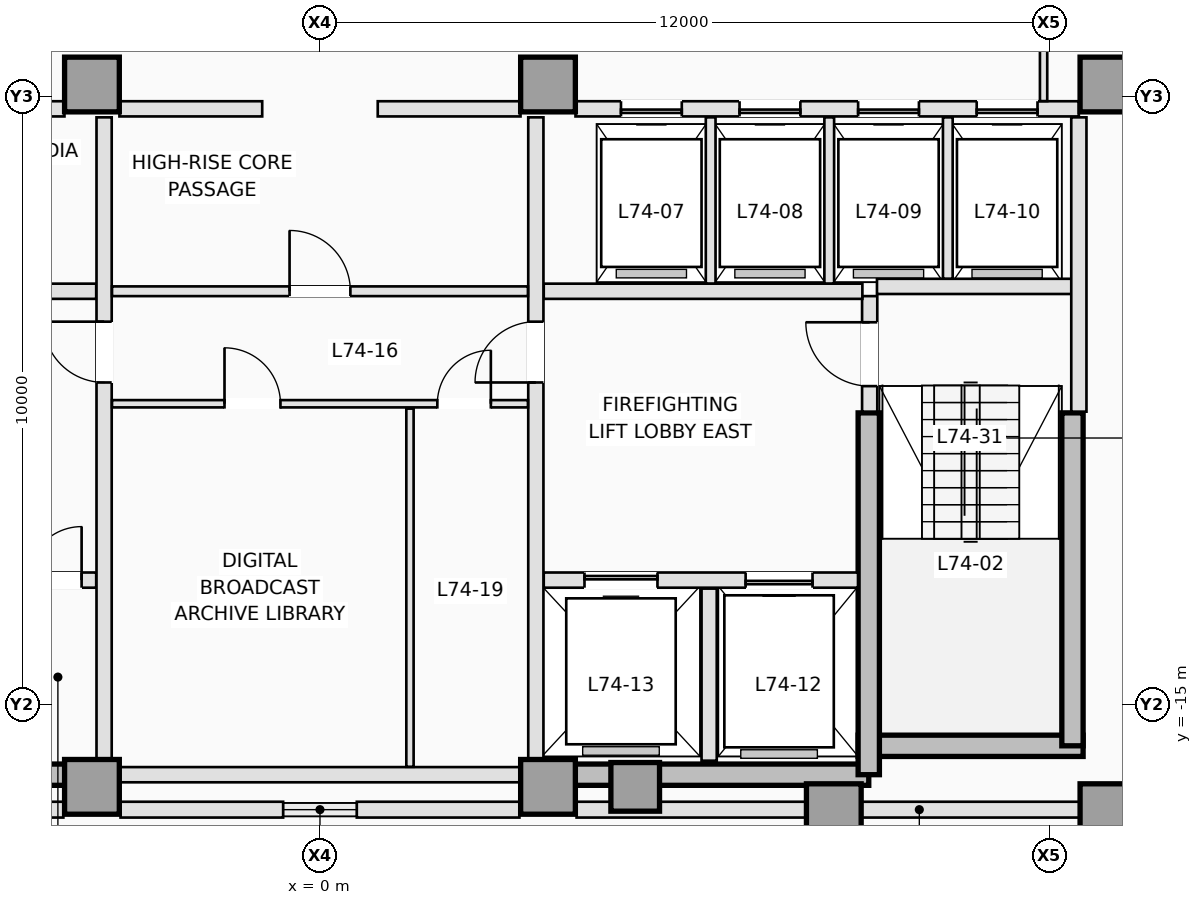
"""IFC4 building model, lengths in metres.
Left out: names, types, materials, properties, quantities, classifications, styles, units other than length and angle.
Written with IfcOpenShell. Run it as: python <this file> out.ifc"""

import sys

from ifc_helpers import new_model, si_unit, direction, frame, frame_2d, origin, origin_2d, place, context, subcontext, project, spatial, rectangle, extrude, element, fill, save


model = new_model("IFC4")
c1 = context("Model", 3, precision=1e-05, world=origin(), true_north=direction((0.0, 1.0)))
c2 = subcontext(c1, "Body", "Model", "MODEL_VIEW")
j1 = project(units=[si_unit("LENGTHUNIT", "METRE"), si_unit("PLANEANGLEUNIT", "RADIAN")], contexts=[c1])
p1 = place(None, origin())
s1 = spatial("IfcSite", under=j1, at=p1, CompositionType="ELEMENT")
p2 = place(p1, origin())
s2 = spatial("IfcBuilding", under=s1, at=p2, CompositionType="ELEMENT")
p3 = place(p2, frame((0.0, 0.0, 267.4)))
s3 = spatial("IfcBuildingStorey", under=s2, at=p3, CompositionType="ELEMENT", Elevation=267.4)
for number, where, z_axis, x_axis in (
    (1, (-9.025, -16.15, 0.0), (0.0, 0.0, 1.0), (1.0, 0.0, 0.0)),
    (2, (3.75, -16.15, 0.0), (0.0, 0.0, 1.0), (1.0, 0.0, 0.0)),
):
    element("IfcWall", number, at=place(p3, frame(where, z_axis=z_axis, x_axis=x_axis)), inside=s3, PredefinedType="SHEAR", context=c2, shape_type="SweptSolid", body=[
        extrude(rectangle(XDim=5.275, YDim=0.35, at=frame_2d((2.637, 0.0))), origin(), (0.0, 0.0, 1.0), 3.5),
    ])
p4 = place(p3, frame((8.85, -15.675, 0.0), z_axis=(0.0, 0.0, 1.0), x_axis=(1.0, 0.0, 0.0)))
e3 = element("IfcWall", 3, at=p4, inside=s3, PredefinedType="SHEAR", context=c2, shape_type="SweptSolid", body=[
    extrude(rectangle(XDim=3.7, YDim=0.35, at=frame_2d((1.85, 0.0))), origin(), (0.0, 0.0, 1.0), 3.5),
])
p5 = place(p3, frame((12.375, -15.675, 0.0), z_axis=(0.0, 0.0, 1.0), x_axis=(0.0, 1.0, 0.0)))
e4 = element("IfcWall", 4, at=p5, inside=s3, PredefinedType="SHEAR", context=c2, shape_type="SweptSolid", body=[
    extrude(rectangle(XDim=5.475, YDim=0.35, at=frame_2d((2.738, 0.0))), origin(), (0.0, 0.0, 1.0), 3.5),
])
p6 = place(p3, frame((9.025, -16.15, 0.0), z_axis=(0.0, 0.0, 1.0), x_axis=(0.0, 1.0, 0.0)))
e5 = element("IfcWall", 5, at=p6, inside=s3, PredefinedType="SHEAR", context=c2, shape_type="SweptSolid", body=[
    extrude(rectangle(XDim=5.95, YDim=0.35, at=frame_2d((2.975, 0.0))), origin(), (0.0, 0.0, 1.0), 3.5),
])
for number, where, z_axis, x_axis in (
    (6, (-3.75, -16.35, 0.0), (0.0, 0.0, 1.0), (1.0, 0.0, 0.0)),
    (7, (3.75, -16.35, 0.0), (0.0, 0.0, 1.0), (1.0, 0.0, 0.0)),
    (8, (8.45, -16.75, 0.0), (0.0, 0.0, 1.0), (1.0, 0.0, 0.0)),
    (9, (12.95, -16.75, 0.0), (0.0, 0.0, 1.0), (1.0, 0.0, 0.0)),
    (10, (-3.75, -4.8, 0.0), (0.0, 0.0, 1.0), (1.0, 0.0, 0.0)),
    (11, (3.75, -4.8, 0.0), (0.0, 0.0, 1.0), (1.0, 0.0, 0.0)),
    (12, (12.95, -4.8, 0.0), (0.0, 0.0, 1.0), (1.0, 0.0, 0.0)),
):
    element("IfcColumn", number, at=place(p3, frame(where, z_axis=z_axis, x_axis=x_axis)), inside=s3, PredefinedType="COLUMN", context=c2, shape_type="SweptSolid", body=[
        extrude(rectangle(XDim=0.9, YDim=0.9, at=origin_2d()), origin(), (0.0, 0.0, 1.0), 3.5),
    ])
p7 = place(p3, frame((5.184, -16.35, 0.0), z_axis=(0.0, 0.0, 1.0), x_axis=(0.0, 1.0, 0.0)))
e13 = element("IfcColumn", 13, at=p7, inside=s3, PredefinedType="COLUMN", context=c2, shape_type="SweptSolid", body=[
    extrude(rectangle(XDim=0.8, YDim=0.8, at=origin_2d()), origin(), (0.0, 0.0, 1.0), 3.5),
])
for number, where, z_axis, x_axis in (
    (14, (15.493, -16.725, 0.0), (0.0, 0.0, 1.0), (-1.0, 0.0, 0.0)),
    (15, (-4.22, -16.725, 0.0), (0.0, 0.0, 1.0), (-1.0, 0.0, 0.0)),
):
    element("IfcWall", number, at=place(p3, frame(where, z_axis=z_axis, x_axis=x_axis)), inside=s3, PredefinedType="STANDARD", context=c2, shape_type="SweptSolid", body=[
        extrude(rectangle(XDim=11.273, YDim=0.26, at=frame_2d((5.636, 0.0))), origin(), (0.0, 0.0, 1.0), 2.72),
    ])
for number, where, z_axis, x_axis in (
    (16, (3.28, -16.725, 0.0), (0.0, 0.0, 1.0), (-1.0, 0.0, 0.0)),
    (17, (-0.606, -16.725, 0.0), (0.0, 0.0, 1.0), (-1.0, 0.0, 0.0)),
):
    element("IfcWall", number, at=place(p3, frame(where, z_axis=z_axis, x_axis=x_axis)), inside=s3, PredefinedType="STANDARD", context=c2, shape_type="SweptSolid", body=[
        extrude(rectangle(XDim=2.674, YDim=0.26, at=frame_2d((1.337, 0.0))), origin(), (0.0, 0.0, 1.0), 3.18),
    ])
p8 = place(p3, frame((9.04, -10.18, 0.0), z_axis=(0.0, 0.0, 1.0), x_axis=(0.0, 1.0, 0.0)))
e18 = element("IfcWall", 18, at=p8, inside=s3, PredefinedType="PARTITIONING", context=c2, shape_type="SweptSolid", body=[
    extrude(rectangle(XDim=1.9, YDim=0.25, at=frame_2d((0.95, 0.0))), origin(), (0.0, 0.0, 1.0), 3.18),
])
p9 = place(p8, frame((0.42, 0.0, 0.0)))
e19 = element("IfcOpeningElement", 19, at=p9, cuts=e18, PredefinedType="OPENING", context=c2, shape_type="SweptSolid", body=[
    extrude(rectangle(XDim=1.05, YDim=2.15, at=frame_2d((0.525, 1.075))), frame((0.0, 0.135, 0.0), z_axis=(0.0, -1.0, 0.0), x_axis=(1.0, 0.0, 0.0)), (0.0, 0.0, 1.0), 0.27),
])
p10 = place(p3, frame((9.16, -8.12, 0.0), z_axis=(0.0, 0.0, 1.0), x_axis=(1.0, 0.0, 0.0)))
e20 = element("IfcWall", 20, at=p10, inside=s3, PredefinedType="PARTITIONING", context=c2, shape_type="SweptSolid", body=[
    extrude(rectangle(XDim=3.22, YDim=0.25, at=frame_2d((1.61, 0.0))), origin(), (0.0, 0.0, 1.0), 3.18),
])
p11 = place(p3, frame((12.48, -10.18, 0.0), z_axis=(0.0, 0.0, 1.0), x_axis=(0.0, 1.0, 0.0)))
e21 = element("IfcWall", 21, at=p11, inside=s3, PredefinedType="PARTITIONING", context=c2, shape_type="SweptSolid", body=[
    extrude(rectangle(XDim=4.84, YDim=0.25, at=frame_2d((2.42, 0.0))), origin(), (0.0, 0.0, 1.0), 3.18),
])
p12 = place(p3, frame((-8.848, -12.95, 0.0), z_axis=(0.0, 0.0, 1.0), x_axis=(1.0, 0.0, 0.0)))
e22 = element("IfcWall", 22, at=p12, inside=s3, PredefinedType="PARTITIONING", context=c2, shape_type="SweptSolid", body=[
    extrude(rectangle(XDim=5.168, YDim=0.25, at=frame_2d((2.584, 0.0))), origin(), (0.0, 0.0, 1.0), 3.18),
])
p13 = place(p12, frame((0.748, 0.0, 0.0)))
e23 = element("IfcOpeningElement", 23, at=p13, cuts=e22, PredefinedType="OPENING", context=c2, shape_type="SweptSolid", body=[
    extrude(rectangle(XDim=1.1, YDim=2.15, at=frame_2d((0.55, 1.075))), frame((0.0, 0.135, 0.0), z_axis=(0.0, -1.0, 0.0), x_axis=(1.0, 0.0, 0.0)), (0.0, 0.0, 1.0), 0.27),
])
p14 = place(p12, frame((2.648, 0.0, 0.0)))
e24 = element("IfcOpeningElement", 24, at=p14, cuts=e22, PredefinedType="OPENING", context=c2, shape_type="SweptSolid", body=[
    extrude(rectangle(XDim=0.88, YDim=2.1, at=frame_2d((0.44, 1.05))), frame((0.0, 0.135, 0.0), z_axis=(0.0, -1.0, 0.0), x_axis=(1.0, 0.0, 0.0)), (0.0, 0.0, 1.0), 0.27),
])
p15 = place(p12, frame((4.048, 0.0, 0.0)))
e25 = element("IfcOpeningElement", 25, at=p15, cuts=e22, PredefinedType="OPENING", context=c2, shape_type="SweptSolid", body=[
    extrude(rectangle(XDim=0.88, YDim=2.1, at=frame_2d((0.44, 1.05))), frame((0.0, 0.135, 0.0), z_axis=(0.0, -1.0, 0.0), x_axis=(1.0, 0.0, 0.0)), (0.0, 0.0, 1.0), 0.27),
])
p16 = place(p3, frame((3.68, -12.95, 0.0), z_axis=(0.0, 0.0, 1.0), x_axis=(1.0, 0.0, 0.0)))
e26 = element("IfcWall", 26, at=p16, inside=s3, PredefinedType="PARTITIONING", context=c2, shape_type="SweptSolid", body=[
    extrude(rectangle(XDim=5.168, YDim=0.25, at=frame_2d((2.584, 0.0))), origin(), (0.0, 0.0, 1.0), 3.18),
])
p17 = place(p16, frame((3.32, 0.0, 0.0)))
e27 = element("IfcOpeningElement", 27, at=p17, cuts=e26, PredefinedType="OPENING", context=c2, shape_type="SweptSolid", body=[
    extrude(rectangle(XDim=1.1, YDim=2.15, at=frame_2d((0.55, 1.075))), frame((0.0, 0.135, 0.0), z_axis=(0.0, -1.0, 0.0), x_axis=(1.0, 0.0, 0.0)), (0.0, 0.0, 1.0), 0.27),
])
p18 = place(p16, frame((0.67, 0.0, 0.0)))
e28 = element("IfcOpeningElement", 28, at=p18, cuts=e26, PredefinedType="OPENING", context=c2, shape_type="SweptSolid", body=[
    extrude(rectangle(XDim=1.2, YDim=2.15, at=frame_2d((0.6, 1.075))), frame((0.0, 0.135, 0.0), z_axis=(0.0, -1.0, 0.0), x_axis=(1.0, 0.0, 0.0)), (0.0, 0.0, 1.0), 0.27),
])
p19 = place(p3, frame((6.4, -15.92, 0.0), z_axis=(0.0, 0.0, 1.0), x_axis=(0.0, 1.0, 0.0)))
e29 = element("IfcWall", 29, at=p19, inside=s3, PredefinedType="PARTITIONING", context=c2, shape_type="SweptSolid", body=[
    extrude(rectangle(XDim=2.83, YDim=0.25, at=frame_2d((1.415, 0.0))), origin(), (0.0, 0.0, 1.0), 3.18),
])
for number, where, z_axis, x_axis in (
    (30, (-8.92, -8.2, 0.0), (0.0, 0.0, 1.0), (1.0, 0.0, 0.0)),
    (31, (3.68, -8.2, 0.0), (0.0, 0.0, 1.0), (1.0, 0.0, 0.0)),
):
    element("IfcWall", number, at=place(p3, frame(where, z_axis=z_axis, x_axis=x_axis)), inside=s3, PredefinedType="PARTITIONING", context=c2, shape_type="SweptSolid", body=[
        extrude(rectangle(XDim=5.24, YDim=0.25, at=frame_2d((2.62, 0.0))), origin(), (0.0, 0.0, 1.0), 3.18),
    ])
p20 = place(p3, frame((-3.55, -15.898, 0.0), z_axis=(0.0, 0.0, 1.0), x_axis=(0.0, 1.0, 0.0)))
e32 = element("IfcWall", 32, at=p20, inside=s3, PredefinedType="PARTITIONING", context=c2, shape_type="SweptSolid", body=[
    extrude(rectangle(XDim=10.558, YDim=0.25, at=frame_2d((5.279, 0.0))), origin(), (0.0, 0.0, 1.0), 3.18),
])
p21 = place(p20, frame((6.198, 0.0, 0.0)))
e33 = element("IfcOpeningElement", 33, at=p21, cuts=e32, PredefinedType="OPENING", context=c2, shape_type="SweptSolid", body=[
    extrude(rectangle(XDim=1.0, YDim=2.15, at=frame_2d((0.5, 1.075))), frame((0.0, 0.135, 0.0), z_axis=(0.0, -1.0, 0.0), x_axis=(1.0, 0.0, 0.0)), (0.0, 0.0, 1.0), 0.27),
])
p22 = place(p3, frame((3.55, -15.898, 0.0), z_axis=(0.0, 0.0, 1.0), x_axis=(0.0, 1.0, 0.0)))
e34 = element("IfcWall", 34, at=p22, inside=s3, PredefinedType="PARTITIONING", context=c2, shape_type="SweptSolid", body=[
    extrude(rectangle(XDim=10.558, YDim=0.25, at=frame_2d((5.279, 0.0))), origin(), (0.0, 0.0, 1.0), 3.18),
])
p23 = place(p22, frame((6.198, 0.0, 0.0)))
e35 = element("IfcOpeningElement", 35, at=p23, cuts=e34, PredefinedType="OPENING", context=c2, shape_type="SweptSolid", body=[
    extrude(rectangle(XDim=1.0, YDim=2.15, at=frame_2d((0.5, 1.075))), frame((0.0, 0.135, 0.0), z_axis=(0.0, -1.0, 0.0), x_axis=(1.0, 0.0, 0.0)), (0.0, 0.0, 1.0), 0.27),
])
p24 = place(p3, frame((-12.48, -5.2, 0.0), z_axis=(0.0, 0.0, 1.0), x_axis=(1.0, 0.0, 0.0)))
e36 = element("IfcWall", 36, at=p24, inside=s3, PredefinedType="PARTITIONING", context=c2, shape_type="SweptSolid", body=[
    extrude(rectangle(XDim=8.278, YDim=0.25, at=frame_2d((4.139, 0.0))), origin(), (0.0, 0.0, 1.0), 3.18),
])
p25 = place(p24, frame((3.05, 0.0, 0.0)))
e37 = element("IfcOpeningElement", 37, at=p25, cuts=e36, PredefinedType="OPENING", context=c2, shape_type="SweptSolid", body=[
    extrude(rectangle(XDim=0.92, YDim=2.12, at=frame_2d((0.46, 1.06))), frame((0.0, 0.135, 0.0), z_axis=(0.0, -1.0, 0.0), x_axis=(1.0, 0.0, 0.0)), (0.0, 0.0, 1.0), 0.27),
])
p26 = place(p24, frame((6.15, 0.0, 0.0)))
e38 = element("IfcOpeningElement", 38, at=p26, cuts=e36, PredefinedType="OPENING", context=c2, shape_type="SweptSolid", body=[
    extrude(rectangle(XDim=0.92, YDim=2.12, at=frame_2d((0.46, 1.06))), frame((0.0, 0.135, 0.0), z_axis=(0.0, -1.0, 0.0), x_axis=(1.0, 0.0, 0.0)), (0.0, 0.0, 1.0), 0.27),
])
p27 = place(p3, frame((4.202, -5.2, 0.0), z_axis=(0.0, 0.0, 1.0), x_axis=(1.0, 0.0, 0.0)))
e39 = element("IfcWall", 39, at=p27, inside=s3, PredefinedType="PARTITIONING", context=c2, shape_type="SweptSolid", body=[
    extrude(rectangle(XDim=8.278, YDim=0.25, at=frame_2d((4.139, 0.0))), origin(), (0.0, 0.0, 1.0), 3.18),
])
p28 = place(p27, frame((0.748, 0.0, 0.0)))
e40 = element("IfcOpeningElement", 40, at=p28, cuts=e39, PredefinedType="OPENING", context=c2, shape_type="SweptSolid", body=[
    extrude(rectangle(XDim=1.0, YDim=2.15, at=frame_2d((0.5, 1.075))), frame((0.0, 0.135, 0.0), z_axis=(0.0, -1.0, 0.0), x_axis=(1.0, 0.0, 0.0)), (0.0, 0.0, 1.0), 0.27),
])
p29 = place(p27, frame((2.698, 0.0, 0.0)))
e41 = element("IfcOpeningElement", 41, at=p29, cuts=e39, PredefinedType="OPENING", context=c2, shape_type="SweptSolid", body=[
    extrude(rectangle(XDim=1.0, YDim=2.15, at=frame_2d((0.5, 1.075))), frame((0.0, 0.135, 0.0), z_axis=(0.0, -1.0, 0.0), x_axis=(1.0, 0.0, 0.0)), (0.0, 0.0, 1.0), 0.27),
])
p30 = place(p27, frame((4.648, 0.0, 0.0)))
e42 = element("IfcOpeningElement", 42, at=p30, cuts=e39, PredefinedType="OPENING", context=c2, shape_type="SweptSolid", body=[
    extrude(rectangle(XDim=1.0, YDim=2.15, at=frame_2d((0.5, 1.075))), frame((0.0, 0.135, 0.0), z_axis=(0.0, -1.0, 0.0), x_axis=(1.0, 0.0, 0.0)), (0.0, 0.0, 1.0), 0.27),
])
p31 = place(p27, frame((6.598, 0.0, 0.0)))
e43 = element("IfcOpeningElement", 43, at=p31, cuts=e39, PredefinedType="OPENING", context=c2, shape_type="SweptSolid", body=[
    extrude(rectangle(XDim=1.0, YDim=2.15, at=frame_2d((0.5, 1.075))), frame((0.0, 0.135, 0.0), z_axis=(0.0, -1.0, 0.0), x_axis=(1.0, 0.0, 0.0)), (0.0, 0.0, 1.0), 0.27),
])
for number, where, z_axis, x_axis in (
    (44, (-3.298, -5.2, 0.0), (0.0, 0.0, 1.0), (1.0, 0.0, 0.0)),
    (45, (0.95, -5.2, 0.0), (0.0, 0.0, 1.0), (1.0, 0.0, 0.0)),
):
    element("IfcWall", number, at=place(p3, frame(where, z_axis=z_axis, x_axis=x_axis)), inside=s3, PredefinedType="PARTITIONING", context=c2, shape_type="SweptSolid", body=[
        extrude(rectangle(XDim=2.348, YDim=0.25, at=frame_2d((1.174, 0.0))), origin(), (0.0, 0.0, 1.0), 3.18),
    ])
for number, where, z_axis, x_axis in (
    (46, (6.425, -8.073, 0.0), (0.0, 0.0, 1.0), (0.0, 1.0, 0.0)),
    (47, (8.375, -8.073, 0.0), (0.0, 0.0, 1.0), (0.0, 1.0, 0.0)),
):
    element("IfcWall", number, at=place(p3, frame(where, z_axis=z_axis, x_axis=x_axis)), inside=s3, PredefinedType="PARTITIONING", context=c2, shape_type="SweptSolid", body=[
        extrude(rectangle(XDim=2.733, YDim=0.16, at=frame_2d((1.366, 0.0))), origin(), (0.0, 0.0, 1.0), 3.18),
    ])
p32 = place(p3, frame((10.325, -7.993, 0.0), z_axis=(0.0, 0.0, 1.0), x_axis=(0.0, 1.0, 0.0)))
e48 = element("IfcWall", 48, at=p32, inside=s3, PredefinedType="PARTITIONING", context=c2, shape_type="SweptSolid", body=[
    extrude(rectangle(XDim=2.653, YDim=0.16, at=frame_2d((1.326, 0.0))), origin(), (0.0, 0.0, 1.0), 3.18),
])
p33 = place(p3, frame((-3.298, -16.15, 0.0), z_axis=(0.0, 0.0, 1.0), x_axis=(1.0, 0.0, 0.0)))
e49 = element("IfcWall", 49, at=p33, inside=s3, PredefinedType="PARTITIONING", context=c2, shape_type="SweptSolid", body=[
    extrude(rectangle(XDim=6.596, YDim=0.25, at=frame_2d((3.298, 0.0))), origin(), (0.0, 0.0, 1.0), 2.774),
])
p34 = place(p3, frame((-3.42, -8.2, 0.0), z_axis=(0.0, 0.0, 1.0), x_axis=(1.0, 0.0, 0.0)))
e50 = element("IfcWall", 50, at=p34, inside=s3, PredefinedType="PARTITIONING", context=c2, shape_type="SweptSolid", body=[
    extrude(rectangle(XDim=6.84, YDim=0.16, at=frame_2d((3.42, 0.0))), origin(), (0.0, 0.0, 1.0), 3.18),
])
p35 = place(p34, frame((2.92, 0.0, 0.0)))
e51 = element("IfcOpeningElement", 51, at=p35, cuts=e50, PredefinedType="OPENING", context=c2, shape_type="SweptSolid", body=[
    extrude(rectangle(XDim=1.0, YDim=2.15, at=frame_2d((0.5, 1.075))), frame((0.0, 0.09, 0.0), z_axis=(0.0, -1.0, 0.0), x_axis=(1.0, 0.0, 0.0)), (0.0, 0.0, 1.0), 0.18),
])
p36 = place(p3, frame((-3.42, -10.05, 0.0), z_axis=(0.0, 0.0, 1.0), x_axis=(1.0, 0.0, 0.0)))
e52 = element("IfcWall", 52, at=p36, inside=s3, PredefinedType="PARTITIONING", context=c2, shape_type="SweptSolid", body=[
    extrude(rectangle(XDim=6.84, YDim=0.12, at=frame_2d((3.42, 0.0))), origin(), (0.0, 0.0, 1.0), 3.18),
])
p37 = place(p36, frame((1.85, 0.0, 0.0)))
e53 = element("IfcOpeningElement", 53, at=p37, cuts=e52, PredefinedType="OPENING", context=c2, shape_type="SweptSolid", body=[
    extrude(rectangle(XDim=0.92, YDim=2.12, at=frame_2d((0.46, 1.06))), frame((0.0, 0.07, 0.0), z_axis=(0.0, -1.0, 0.0), x_axis=(1.0, 0.0, 0.0)), (0.0, 0.0, 1.0), 0.14),
])
p38 = place(p36, frame((5.35, 0.0, 0.0)))
e54 = element("IfcOpeningElement", 54, at=p38, cuts=e52, PredefinedType="OPENING", context=c2, shape_type="SweptSolid", body=[
    extrude(rectangle(XDim=0.88, YDim=2.12, at=frame_2d((0.44, 1.06))), frame((0.0, 0.07, 0.0), z_axis=(0.0, -1.0, 0.0), x_axis=(1.0, 0.0, 0.0)), (0.0, 0.0, 1.0), 0.14),
])
p39 = place(p3, frame((1.48, -16.02, 0.0), z_axis=(0.0, 0.0, 1.0), x_axis=(0.0, 1.0, 0.0)))
e55 = element("IfcWall", 55, at=p39, inside=s3, PredefinedType="PARTITIONING", context=c2, shape_type="SweptSolid", body=[
    extrude(rectangle(XDim=5.89, YDim=0.12, at=frame_2d((2.945, 0.0))), origin(), (0.0, 0.0, 1.0), 3.18),
])
p40 = place(p3, frame((11.9, -2.792, 0.0), z_axis=(0.0, 0.0, 1.0), x_axis=(0.0, -1.0, 0.0)))
e56 = element("IfcWall", 56, at=p40, inside=s3, PredefinedType="PARTITIONING", context=c2, shape_type="SweptSolid", body=[
    extrude(rectangle(XDim=2.281, YDim=0.12, at=frame_2d((1.141, 0.0))), origin(), (0.0, 0.0, 1.0), 3.18),
])
p41 = place(p28, origin())
e57 = element("IfcDoor", 57, at=p41, inside=s3, OperationType="SLIDING_TO_RIGHT", PredefinedType="DOOR", context=c2, shape_type="SweptSolid", body=[
    extrude(rectangle(XDim=1.0, YDim=2.15, at=frame_2d((0.5, 1.075))), frame((0.0, 0.025, 0.0), z_axis=(0.0, -1.0, 0.0), x_axis=(1.0, 0.0, 0.0)), (0.0, 0.0, 1.0), 0.05),
])
fill(e40, e57)
p42 = place(p29, origin())
e58 = element("IfcDoor", 58, at=p42, inside=s3, OperationType="SLIDING_TO_RIGHT", PredefinedType="DOOR", context=c2, shape_type="SweptSolid", body=[
    extrude(rectangle(XDim=1.0, YDim=2.15, at=frame_2d((0.5, 1.075))), frame((0.0, 0.025, 0.0), z_axis=(0.0, -1.0, 0.0), x_axis=(1.0, 0.0, 0.0)), (0.0, 0.0, 1.0), 0.05),
])
fill(e41, e58)
p43 = place(p30, origin())
e59 = element("IfcDoor", 59, at=p43, inside=s3, OperationType="SLIDING_TO_RIGHT", PredefinedType="DOOR", context=c2, shape_type="SweptSolid", body=[
    extrude(rectangle(XDim=1.0, YDim=2.15, at=frame_2d((0.5, 1.075))), frame((0.0, 0.025, 0.0), z_axis=(0.0, -1.0, 0.0), x_axis=(1.0, 0.0, 0.0)), (0.0, 0.0, 1.0), 0.05),
])
fill(e42, e59)
p44 = place(p31, origin())
e60 = element("IfcDoor", 60, at=p44, inside=s3, OperationType="SLIDING_TO_RIGHT", PredefinedType="DOOR", context=c2, shape_type="SweptSolid", body=[
    extrude(rectangle(XDim=1.0, YDim=2.15, at=frame_2d((0.5, 1.075))), frame((0.0, 0.025, 0.0), z_axis=(0.0, -1.0, 0.0), x_axis=(1.0, 0.0, 0.0)), (0.0, 0.0, 1.0), 0.05),
])
fill(e43, e60)
p45 = place(p17, origin())
e61 = element("IfcDoor", 61, at=p45, inside=s3, OperationType="SLIDING_TO_RIGHT", PredefinedType="DOOR", context=c2, shape_type="SweptSolid", body=[
    extrude(rectangle(XDim=1.1, YDim=2.15, at=frame_2d((0.55, 1.075))), frame((0.0, 0.025, 0.0), z_axis=(0.0, -1.0, 0.0), x_axis=(1.0, 0.0, 0.0)), (0.0, 0.0, 1.0), 0.05),
])
fill(e27, e61)
p46 = place(p18, origin())
e62 = element("IfcDoor", 62, at=p46, inside=s3, OperationType="SLIDING_TO_LEFT", PredefinedType="DOOR", context=c2, shape_type="SweptSolid", body=[
    extrude(rectangle(XDim=1.2, YDim=2.15, at=frame_2d((0.6, 1.075))), frame((0.0, 0.025, 0.0), z_axis=(0.0, -1.0, 0.0), x_axis=(1.0, 0.0, 0.0)), (0.0, 0.0, 1.0), 0.05),
])
fill(e28, e62)
p47 = place(p9, origin())
e63 = element("IfcDoor", 63, at=p47, inside=s3, OperationType="SINGLE_SWING_RIGHT", PredefinedType="DOOR", context=c2, shape_type="SweptSolid", body=[
    extrude(rectangle(XDim=1.05, YDim=2.15, at=frame_2d((0.525, 1.075))), frame((0.0, 0.025, 0.0), z_axis=(0.0, -1.0, 0.0), x_axis=(1.0, 0.0, 0.0)), (0.0, 0.0, 1.0), 0.05),
])
fill(e19, e63)
p48 = place(p15, origin())
e64 = element("IfcDoor", 64, at=p48, inside=s3, OperationType="SINGLE_SWING_RIGHT", PredefinedType="TRAPDOOR", context=c2, shape_type="SweptSolid", body=[
    extrude(rectangle(XDim=0.88, YDim=2.1, at=frame_2d((0.44, 1.05))), frame((0.0, 0.025, 0.0), z_axis=(0.0, -1.0, 0.0), x_axis=(1.0, 0.0, 0.0)), (0.0, 0.0, 1.0), 0.05),
])
fill(e25, e64)
p49 = place(p21, origin())
e65 = element("IfcDoor", 65, at=p49, inside=s3, OperationType="SINGLE_SWING_RIGHT", PredefinedType="DOOR", context=c2, shape_type="SweptSolid", body=[
    extrude(rectangle(XDim=1.0, YDim=2.15, at=frame_2d((0.5, 1.075))), frame((0.0, 0.025, 0.0), z_axis=(0.0, -1.0, 0.0), x_axis=(1.0, 0.0, 0.0)), (0.0, 0.0, 1.0), 0.05),
])
fill(e33, e65)
p50 = place(p23, origin())
e66 = element("IfcDoor", 66, at=p50, inside=s3, OperationType="SINGLE_SWING_LEFT", PredefinedType="DOOR", context=c2, shape_type="SweptSolid", body=[
    extrude(rectangle(XDim=1.0, YDim=2.15, at=frame_2d((0.5, 1.075))), frame((0.0, 0.025, 0.0), z_axis=(0.0, -1.0, 0.0), x_axis=(1.0, 0.0, 0.0)), (0.0, 0.0, 1.0), 0.05),
])
fill(e35, e66)
p51 = place(p35, origin())
e67 = element("IfcDoor", 67, at=p51, inside=s3, OperationType="SINGLE_SWING_LEFT", PredefinedType="DOOR", context=c2, shape_type="SweptSolid", body=[
    extrude(rectangle(XDim=1.0, YDim=2.15, at=frame_2d((0.5, 1.075))), frame((0.0, 0.025, 0.0), z_axis=(0.0, -1.0, 0.0), x_axis=(1.0, 0.0, 0.0)), (0.0, 0.0, 1.0), 0.05),
])
fill(e51, e67)
p52 = place(p37, origin())
e68 = element("IfcDoor", 68, at=p52, inside=s3, OperationType="SINGLE_SWING_LEFT", PredefinedType="DOOR", context=c2, shape_type="SweptSolid", body=[
    extrude(rectangle(XDim=0.92, YDim=2.12, at=frame_2d((0.46, 1.06))), frame((0.0, 0.025, 0.0), z_axis=(0.0, -1.0, 0.0), x_axis=(1.0, 0.0, 0.0)), (0.0, 0.0, 1.0), 0.05),
])
fill(e53, e68)
p53 = place(p38, origin())
e69 = element("IfcDoor", 69, at=p53, inside=s3, OperationType="SINGLE_SWING_RIGHT", PredefinedType="DOOR", context=c2, shape_type="SweptSolid", body=[
    extrude(rectangle(XDim=0.88, YDim=2.12, at=frame_2d((0.44, 1.06))), frame((0.0, 0.025, 0.0), z_axis=(0.0, -1.0, 0.0), x_axis=(1.0, 0.0, 0.0)), (0.0, 0.0, 1.0), 0.05),
])
fill(e54, e69)
save(model, sys.argv[1])
